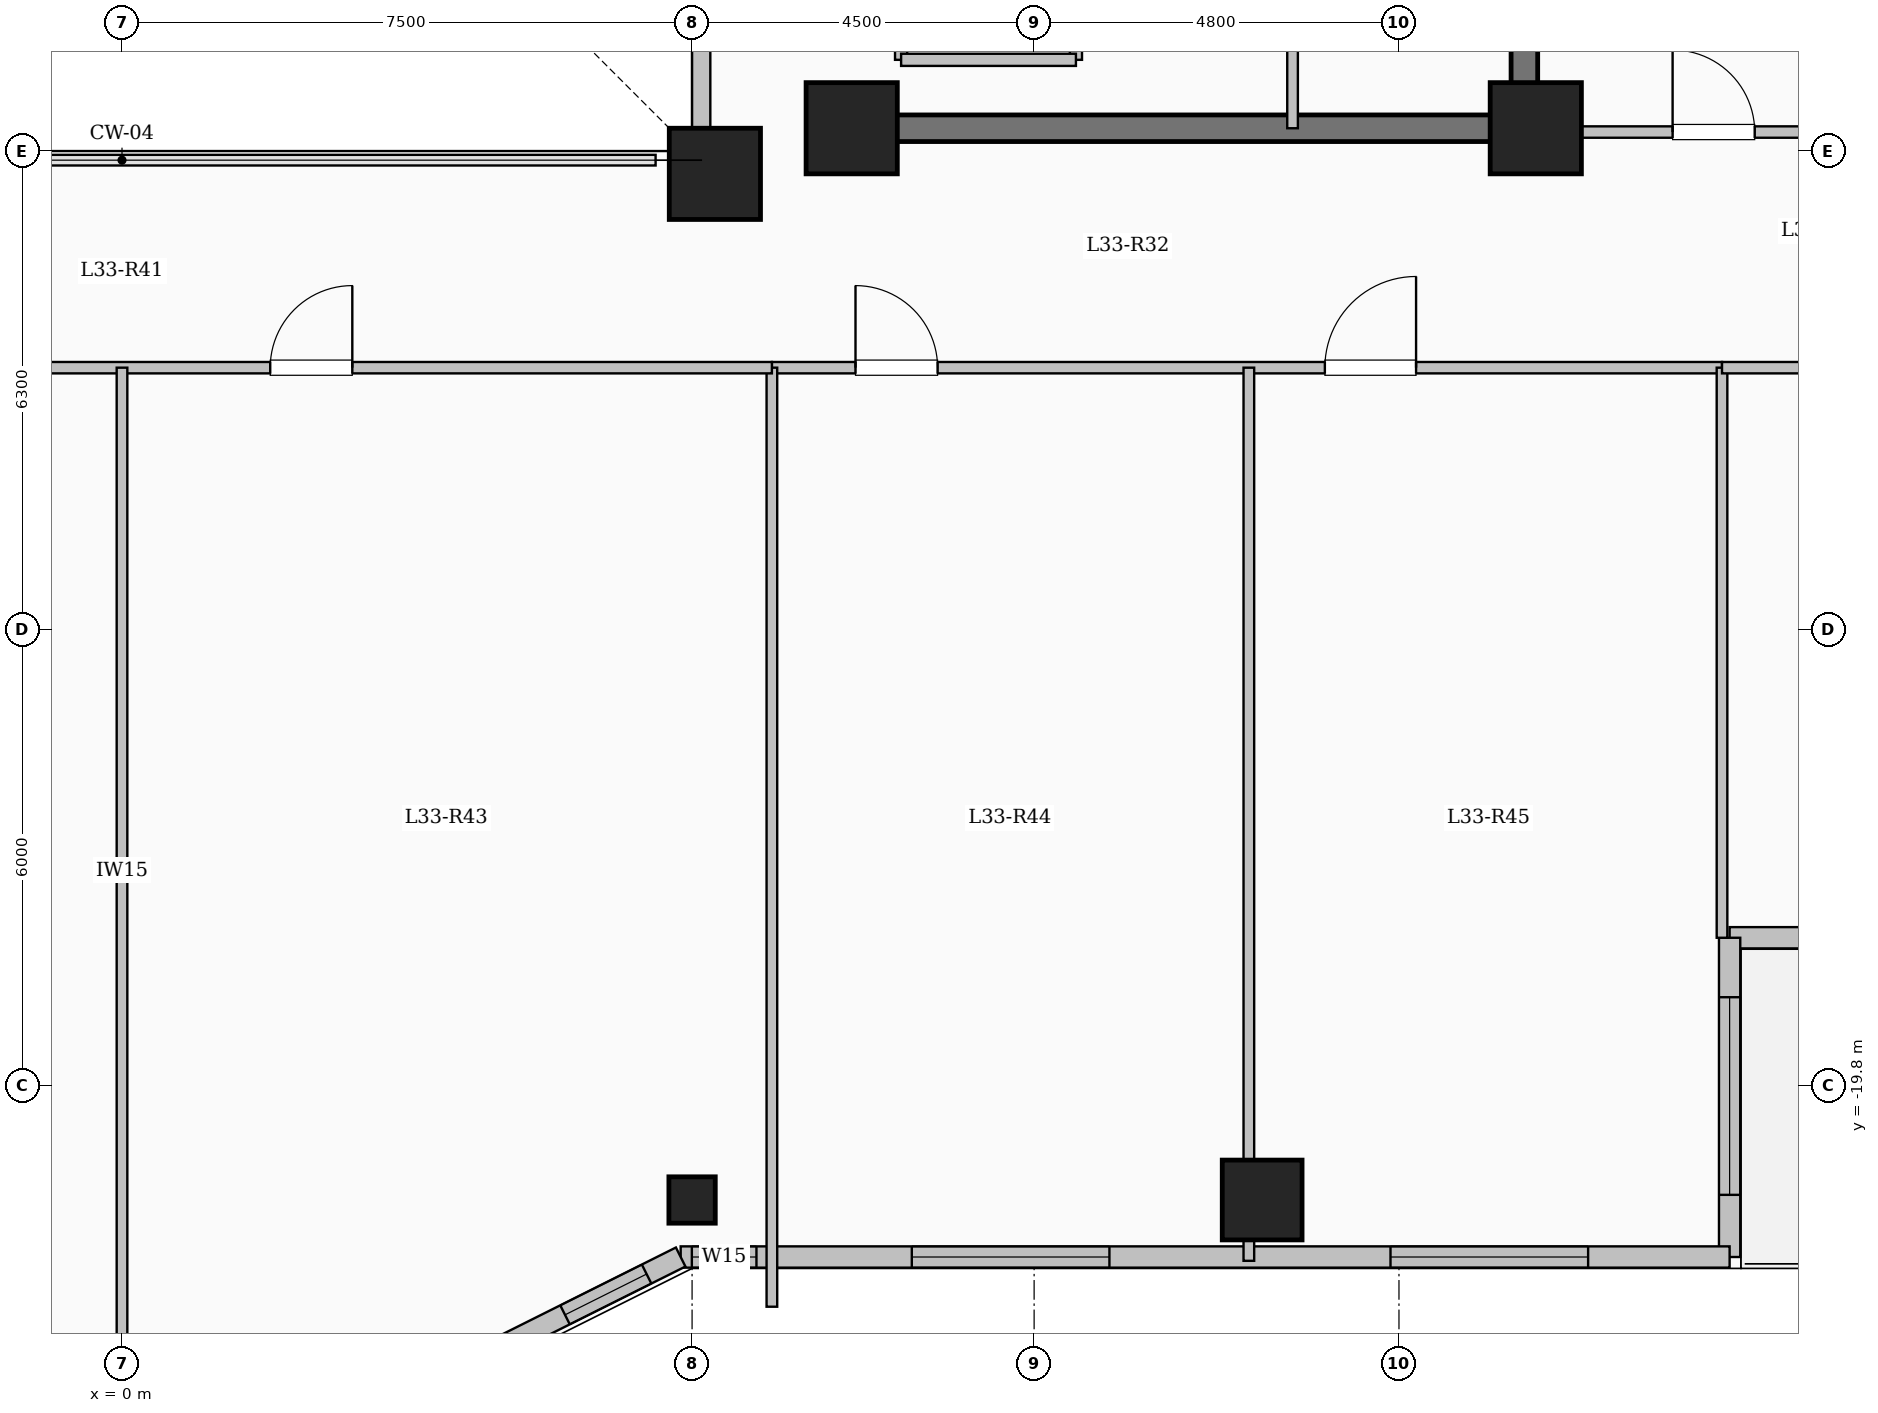
"""IFC4 building model, lengths in metres.
Left out: names, types, materials, properties, quantities, classifications, styles, units other than length and angle.
Written with IfcOpenShell. Run it as: python <this file> out.ifc"""

import sys

from ifc_helpers import new_model, si_unit, direction, frame, frame_2d, origin, origin_2d, place, context, subcontext, project, spatial, rectangle, hollow_circle, extrude, element, fill, save


model = new_model("IFC4")
c1 = context("Model", 3, precision=1e-05, world=origin(), true_north=direction((0.0, 1.0)))
c2 = subcontext(c1, "Body", "Model", "MODEL_VIEW")
j1 = project(units=[si_unit("LENGTHUNIT", "METRE"), si_unit("PLANEANGLEUNIT", "RADIAN")], contexts=[c1])
p1 = place(None, origin())
s1 = spatial("IfcSite", under=j1, at=p1, CompositionType="ELEMENT")
p2 = place(p1, origin())
s2 = spatial("IfcBuilding", under=s1, at=p2, CompositionType="ELEMENT")
p3 = place(p2, frame((0.0, 0.0, 123.0)))
s3 = spatial("IfcBuildingStorey", under=s2, at=p3, CompositionType="ELEMENT", Elevation=123.0)
for number, where, z_axis, x_axis in (
    (1, (7.8, -7.8, 0.0), (0.0, 0.0, 1.0), (1.0, 0.0, 0.0)),
    (2, (9.6, -7.2, 0.0), (0.0, 0.0, 1.0), (1.0, 0.0, 0.0)),
    (3, (18.6, -7.2, 0.0), (0.0, 0.0, 1.0), (1.0, 0.0, 0.0)),
):
    element("IfcColumn", number, at=place(p3, frame(where, z_axis=z_axis, x_axis=x_axis)), inside=s3, PredefinedType="COLUMN", context=c2, shape_type="SweptSolid", body=[
        extrude(rectangle(XDim=1.2, YDim=1.2, at=origin_2d()), origin(), (0.0, 0.0, 1.0), 4.5),
    ])
p4 = place(p3, frame((7.5, -21.3, 0.0), z_axis=(0.0, 0.0, 1.0), x_axis=(1.0, 0.0, 0.0)))
e4 = element("IfcColumn", 4, at=p4, inside=s3, PredefinedType="COLUMN", context=c2, shape_type="SweptSolid", body=[
    extrude(hollow_circle(Radius=0.305, WallThickness=0.025, at=origin_2d()), origin(), (0.0, 0.0, 1.0), 4.5),
])
p5 = place(p3, frame((15.0, -21.3, 0.0), z_axis=(0.0, 0.0, 1.0), x_axis=(1.0, 0.0, 0.0)))
e5 = element("IfcColumn", 5, at=p5, inside=s3, PredefinedType="COLUMN", context=c2, shape_type="SweptSolid", body=[
    extrude(rectangle(XDim=1.05, YDim=1.05, at=origin_2d()), origin(), (0.0, 0.0, 1.0), 4.5),
])
p6 = place(p3, frame((7.62, -7.62, 0.0), z_axis=(0.0, 0.0, 1.0), x_axis=(0.0, 1.0, 0.0)))
e6 = element("IfcWall", 6, at=p6, inside=s3, PredefinedType="SOLIDWALL", context=c2, shape_type="SweptSolid", body=[
    extrude(rectangle(XDim=15.24, YDim=0.24, at=frame_2d((7.62, 0.0))), origin(), (0.0, 0.0, 1.0), 4.2),
])
p7 = place(p6, frame((6.92, 0.0, 0.95)))
e7 = element("IfcOpeningElement", 7, at=p7, cuts=e6, PredefinedType="OPENING", context=c2, shape_type="SweptSolid", body=[
    extrude(rectangle(XDim=1.4, YDim=1.5, at=frame_2d((0.7, 0.75))), frame((0.0, 0.13, 0.0), z_axis=(0.0, -1.0, 0.0), x_axis=(1.0, 0.0, 0.0)), (0.0, 0.0, 1.0), 0.26),
])
p8 = place(p3, frame((26.85, -17.85, 0.0), z_axis=(0.0, 0.0, 1.0), x_axis=(-1.0, 0.0, 0.0)))
e8 = element("IfcWall", 8, at=p8, inside=s3, PredefinedType="SOLIDWALL", context=c2, shape_type="SweptSolid", body=[
    extrude(rectangle(XDim=5.7, YDim=0.28, at=frame_2d((2.85, 0.0))), origin(), (0.0, 0.0, 1.0), 4.2),
])
p9 = place(p8, frame((2.5, 0.0, 0.0)))
e9 = element("IfcOpeningElement", 9, at=p9, cuts=e8, PredefinedType="OPENING", context=c2, shape_type="SweptSolid", body=[
    extrude(rectangle(XDim=1.1, YDim=2.2, at=frame_2d((0.55, 1.1))), frame((0.0, 0.15, 0.0), z_axis=(0.0, -1.0, 0.0), x_axis=(1.0, 0.0, 0.0)), (0.0, 0.0, 1.0), 0.3),
])
p10 = place(p8, frame((0.755, 0.0, 0.95)))
e10 = element("IfcOpeningElement", 10, at=p10, cuts=e8, PredefinedType="OPENING", context=c2, shape_type="SweptSolid", body=[
    extrude(rectangle(XDim=1.2, YDim=1.5, at=frame_2d((0.6, 0.75))), frame((0.0, 0.15, 0.0), z_axis=(0.0, -1.0, 0.0), x_axis=(1.0, 0.0, 0.0)), (0.0, 0.0, 1.0), 0.3),
])
p11 = place(p3, frame((21.15, -17.85, 0.0), z_axis=(0.0, 0.0, 1.0), x_axis=(0.0, -1.0, 0.0)))
e11 = element("IfcWall", 11, at=p11, inside=s3, PredefinedType="SOLIDWALL", context=c2, shape_type="SweptSolid", body=[
    extrude(rectangle(XDim=4.2, YDim=0.28, at=frame_2d((2.1, 0.0))), origin(), (0.0, 0.0, 1.0), 4.2),
])
p12 = place(p11, frame((0.782, 0.0, 0.85)))
e12 = element("IfcOpeningElement", 12, at=p12, cuts=e11, PredefinedType="OPENING", context=c2, shape_type="SweptSolid", body=[
    extrude(rectangle(XDim=2.6, YDim=2.4, at=frame_2d((1.3, 1.2))), frame((0.0, 0.15, 0.0), z_axis=(0.0, -1.0, 0.0), x_axis=(1.0, 0.0, 0.0)), (0.0, 0.0, 1.0), 0.3),
])
p13 = place(p3, frame((21.15, -22.05, 0.0), z_axis=(0.0, 0.0, 1.0), x_axis=(-1.0, 0.0, 0.0)))
e13 = element("IfcWall", 13, at=p13, inside=s3, PredefinedType="SOLIDWALL", context=c2, shape_type="SweptSolid", body=[
    extrude(rectangle(XDim=13.8, YDim=0.28, at=frame_2d((6.9, 0.0))), origin(), (0.0, 0.0, 1.0), 4.2),
])
p14 = place(p13, frame((1.862, 0.0, 0.85)))
e14 = element("IfcOpeningElement", 14, at=p14, cuts=e13, PredefinedType="OPENING", context=c2, shape_type="SweptSolid", body=[
    extrude(rectangle(XDim=2.6, YDim=2.4, at=frame_2d((1.3, 1.2))), frame((0.0, 0.15, 0.0), z_axis=(0.0, -1.0, 0.0), x_axis=(1.0, 0.0, 0.0)), (0.0, 0.0, 1.0), 0.3),
])
p15 = place(p13, frame((8.159, 0.0, 0.85)))
e15 = element("IfcOpeningElement", 15, at=p15, cuts=e13, PredefinedType="OPENING", context=c2, shape_type="SweptSolid", body=[
    extrude(rectangle(XDim=2.6, YDim=2.4, at=frame_2d((1.3, 1.2))), frame((0.0, 0.15, 0.0), z_axis=(0.0, -1.0, 0.0), x_axis=(1.0, 0.0, 0.0)), (0.0, 0.0, 1.0), 0.3),
])
p16 = place(p13, frame((12.803, 0.0, 0.95)))
e16 = element("IfcOpeningElement", 16, at=p16, cuts=e13, PredefinedType="OPENING", context=c2, shape_type="SweptSolid", body=[
    extrude(rectangle(XDim=0.85, YDim=1.5, at=frame_2d((0.425, 0.75))), frame((0.0, 0.15, 0.0), z_axis=(0.0, -1.0, 0.0), x_axis=(1.0, 0.0, 0.0)), (0.0, 0.0, 1.0), 0.3),
])
p17 = place(p3, frame((7.35, -22.05, 0.0), z_axis=(0.0, 0.0, 1.0), x_axis=(-0.894427191, -0.4472135955, 0.0)))
e17 = element("IfcWall", 17, at=p17, inside=s3, PredefinedType="SOLIDWALL", context=c2, shape_type="SweptSolid", body=[
    extrude(rectangle(XDim=3.354, YDim=0.28, at=frame_2d((1.677, 0.0))), origin(), (0.0, 0.0, 1.0), 4.2),
])
p18 = place(p17, frame((0.501, 0.0, 0.95)))
e18 = element("IfcOpeningElement", 18, at=p18, cuts=e17, PredefinedType="OPENING", context=c2, shape_type="SweptSolid", body=[
    extrude(rectangle(XDim=1.2, YDim=1.5, at=frame_2d((0.6, 0.75))), frame((0.0, 0.15, 0.0), z_axis=(0.0, -1.0, 0.0), x_axis=(1.0, 0.0, 0.0)), (0.0, 0.0, 1.0), 0.3),
])
p19 = place(p3, frame((10.25, -6.3, 0.0), z_axis=(0.0, 0.0, 1.0), x_axis=(0.0, 1.0, 0.0)))
e19 = element("IfcWall", 19, at=p19, inside=s3, PredefinedType="SOLIDWALL", context=c2, shape_type="SweptSolid", body=[
    extrude(rectangle(XDim=2.6, YDim=0.16, at=frame_2d((1.3, 0.0))), origin(), (0.0, 0.0, 1.0), 4.2),
])
p20 = place(p19, frame((0.75, 0.0, 0.0)))
e20 = element("IfcOpeningElement", 20, at=p20, cuts=e19, PredefinedType="OPENING", context=c2, shape_type="SweptSolid", body=[
    extrude(rectangle(XDim=1.1, YDim=2.15, at=frame_2d((0.55, 1.075))), frame((0.0, 0.09, 0.0), z_axis=(0.0, -1.0, 0.0), x_axis=(1.0, 0.0, 0.0)), (0.0, 0.0, 1.0), 0.18),
])
p21 = place(p3, frame((12.55, -6.3, 0.0), z_axis=(0.0, 0.0, 1.0), x_axis=(0.0, 1.0, 0.0)))
e21 = element("IfcWall", 21, at=p21, inside=s3, PredefinedType="SOLIDWALL", context=c2, shape_type="SweptSolid", body=[
    extrude(rectangle(XDim=2.6, YDim=0.16, at=frame_2d((1.3, 0.0))), origin(), (0.0, 0.0, 1.0), 4.2),
])
p22 = place(p3, frame((10.25, -6.3, 0.0), z_axis=(0.0, 0.0, 1.0), x_axis=(1.0, 0.0, 0.0)))
e22 = element("IfcWall", 22, at=p22, inside=s3, PredefinedType="SOLIDWALL", context=c2, shape_type="SweptSolid", body=[
    extrude(rectangle(XDim=2.3, YDim=0.16, at=frame_2d((1.15, 0.0))), origin(), (0.0, 0.0, 1.0), 4.2),
])
p23 = place(p3, frame((18.45, -7.375, 0.0), z_axis=(0.0, 0.0, 1.0), x_axis=(0.0, 1.0, 0.0)))
e23 = element("IfcWall", 23, at=p23, inside=s3, PredefinedType="SHEAR", context=c2, shape_type="SweptSolid", body=[
    extrude(rectangle(XDim=14.05, YDim=0.35, at=frame_2d((7.025, 0.0))), origin(), (0.0, 0.0, 1.0), 4.5),
])
p24 = place(p3, frame((10.075, -7.2, 0.0), z_axis=(0.0, 0.0, 1.0), x_axis=(1.0, 0.0, 0.0)))
e24 = element("IfcWall", 24, at=p24, inside=s3, PredefinedType="SHEAR", context=c2, shape_type="SweptSolid", body=[
    extrude(rectangle(XDim=8.55, YDim=0.35, at=frame_2d((4.275, 0.0))), origin(), (0.0, 0.0, 1.0), 4.5),
])
p25 = place(p3, frame((15.4, -7.2, 0.0), z_axis=(0.0, 0.0, 1.0), x_axis=(0.0, 1.0, 0.0)))
e25 = element("IfcWall", 25, at=p25, inside=s3, PredefinedType="PARTITIONING", context=c2, shape_type="SweptSolid", body=[
    extrude(rectangle(XDim=10.45, YDim=0.14, at=frame_2d((5.225, 0.0))), origin(), (0.0, 0.0, 1.0), 4.2),
])
p26 = place(p25, frame((9.25, 0.0, 0.0)))
e26 = element("IfcOpeningElement", 26, at=p26, cuts=e25, PredefinedType="OPENING", context=c2, shape_type="SweptSolid", body=[
    extrude(rectangle(XDim=0.9, YDim=2.08, at=frame_2d((0.45, 1.04))), frame((0.0, 0.08, 0.0), z_axis=(0.0, -1.0, 0.0), x_axis=(1.0, 0.0, 0.0)), (0.0, 0.0, 1.0), 0.16),
])
p27 = place(p3, frame((8.55, -10.35, 0.0), z_axis=(0.0, 0.0, 1.0), x_axis=(1.0, 0.0, 0.0)))
e27 = element("IfcWall", 27, at=p27, inside=s3, PredefinedType="PARTITIONING", context=c2, shape_type="SweptSolid", body=[
    extrude(rectangle(XDim=12.5, YDim=0.15, at=frame_2d((6.25, 0.0))), origin(), (0.0, 0.0, 1.0), 4.2),
])
p28 = place(p27, frame((1.1, 0.0, 0.0)))
e28 = element("IfcOpeningElement", 28, at=p28, cuts=e27, PredefinedType="OPENING", context=c2, shape_type="SweptSolid", body=[
    extrude(rectangle(XDim=1.08, YDim=2.15, at=frame_2d((0.54, 1.075))), frame((0.0, 0.085, 0.0), z_axis=(0.0, -1.0, 0.0), x_axis=(1.0, 0.0, 0.0)), (0.0, 0.0, 1.0), 0.17),
])
p29 = place(p27, frame((7.275, 0.0, 0.0)))
e29 = element("IfcOpeningElement", 29, at=p29, cuts=e27, PredefinedType="OPENING", context=c2, shape_type="SweptSolid", body=[
    extrude(rectangle(XDim=1.2, YDim=2.15, at=frame_2d((0.6, 1.075))), frame((0.0, 0.085, 0.0), z_axis=(0.0, -1.0, 0.0), x_axis=(1.0, 0.0, 0.0)), (0.0, 0.0, 1.0), 0.17),
])
p30 = place(p3, frame((8.55, -22.704, 0.0), z_axis=(0.0, 0.0, 1.0), x_axis=(0.0, 1.0, 0.0)))
e30 = element("IfcWall", 30, at=p30, inside=s3, PredefinedType="PARTITIONING", context=c2, shape_type="SweptSolid", body=[
    extrude(rectangle(XDim=12.354, YDim=0.14, at=frame_2d((6.177, 0.0))), origin(), (0.0, 0.0, 1.0), 4.2),
])
p31 = place(p3, frame((14.825, -22.1, 0.0), z_axis=(0.0, 0.0, 1.0), x_axis=(0.0, 1.0, 0.0)))
e31 = element("IfcWall", 31, at=p31, inside=s3, PredefinedType="PARTITIONING", context=c2, shape_type="SweptSolid", body=[
    extrude(rectangle(XDim=11.75, YDim=0.14, at=frame_2d((5.875, 0.0))), origin(), (0.0, 0.0, 1.0), 3.535),
])
p32 = place(p3, frame((-8.55, -10.35, 0.0), z_axis=(0.0, 0.0, 1.0), x_axis=(1.0, 0.0, 0.0)))
e32 = element("IfcWall", 32, at=p32, inside=s3, PredefinedType="PARTITIONING", context=c2, shape_type="SweptSolid", body=[
    extrude(rectangle(XDim=17.1, YDim=0.15, at=frame_2d((8.55, 0.0))), origin(), (0.0, 0.0, 1.0), 4.2),
])
p33 = place(p32, frame((1.4, 0.0, 0.0)))
e33 = element("IfcOpeningElement", 33, at=p33, cuts=e32, PredefinedType="OPENING", context=c2, shape_type="SweptSolid", body=[
    extrude(rectangle(XDim=1.08, YDim=2.15, at=frame_2d((0.54, 1.075))), frame((0.0, 0.085, 0.0), z_axis=(0.0, -1.0, 0.0), x_axis=(1.0, 0.0, 0.0)), (0.0, 0.0, 1.0), 0.17),
])
p34 = place(p32, frame((10.5, 0.0, 0.0)))
e34 = element("IfcOpeningElement", 34, at=p34, cuts=e32, PredefinedType="OPENING", context=c2, shape_type="SweptSolid", body=[
    extrude(rectangle(XDim=1.08, YDim=2.15, at=frame_2d((0.54, 1.075))), frame((0.0, 0.085, 0.0), z_axis=(0.0, -1.0, 0.0), x_axis=(1.0, 0.0, 0.0)), (0.0, 0.0, 1.0), 0.17),
])
p35 = place(p3, frame((0.0, -23.58, 0.0), z_axis=(0.0, 0.0, 1.0), x_axis=(0.0, 1.0, 0.0)))
e35 = element("IfcWall", 35, at=p35, inside=s3, PredefinedType="PARTITIONING", context=c2, shape_type="SweptSolid", body=[
    extrude(rectangle(XDim=13.23, YDim=0.14, at=frame_2d((6.615, 0.0))), origin(), (0.0, 0.0, 1.0), 4.2),
])
p36 = place(p3, frame((18.45, -7.25, 0.0), z_axis=(0.0, 0.0, 1.0), x_axis=(1.0, 0.0, 0.0)))
e36 = element("IfcWall", 36, at=p36, inside=s3, PredefinedType="PARTITIONING", context=c2, shape_type="SweptSolid", body=[
    extrude(rectangle(XDim=8.43, YDim=0.15, at=frame_2d((4.215, 0.0))), origin(), (0.0, 0.0, 1.0), 4.2),
])
p37 = place(p36, frame((1.95, 0.0, 0.0)))
e37 = element("IfcOpeningElement", 37, at=p37, cuts=e36, PredefinedType="OPENING", context=c2, shape_type="SweptSolid", body=[
    extrude(rectangle(XDim=1.08, YDim=2.15, at=frame_2d((0.54, 1.075))), frame((0.0, 0.085, 0.0), z_axis=(0.0, -1.0, 0.0), x_axis=(1.0, 0.0, 0.0)), (0.0, 0.0, 1.0), 0.17),
])
p38 = place(p3, frame((21.05, -17.85, 0.0), z_axis=(0.0, 0.0, 1.0), x_axis=(0.0, 1.0, 0.0)))
e38 = element("IfcWall", 38, at=p38, inside=s3, PredefinedType="PARTITIONING", context=c2, shape_type="SweptSolid", body=[
    extrude(rectangle(XDim=7.5, YDim=0.14, at=frame_2d((3.75, 0.0))), origin(), (0.0, 0.0, 1.0), 4.2),
])
p39 = place(p3, frame((21.05, -10.35, 0.0), z_axis=(0.0, 0.0, 1.0), x_axis=(1.0, 0.0, 0.0)))
e39 = element("IfcWall", 39, at=p39, inside=s3, PredefinedType="PARTITIONING", context=c2, shape_type="SweptSolid", body=[
    extrude(rectangle(XDim=5.83, YDim=0.15, at=frame_2d((2.915, 0.0))), origin(), (0.0, 0.0, 1.0), 4.2),
])
p40 = place(p39, frame((2.44, 0.0, 0.0)))
e40 = element("IfcOpeningElement", 40, at=p40, cuts=e39, PredefinedType="OPENING", context=c2, shape_type="SweptSolid", body=[
    extrude(rectangle(XDim=0.95, YDim=2.15, at=frame_2d((0.475, 1.075))), frame((0.0, 0.085, 0.0), z_axis=(0.0, -1.0, 0.0), x_axis=(1.0, 0.0, 0.0)), (0.0, 0.0, 1.0), 0.17),
])
p41 = place(p12, origin())
e41 = element("IfcWindow", 41, at=p41, inside=s3, PartitioningType="SINGLE_PANEL", PredefinedType="WINDOW", context=c2, shape_type="SweptSolid", body=[
    extrude(rectangle(XDim=2.6, YDim=2.4, at=frame_2d((1.3, 1.2))), frame((0.0, 0.03, 0.0), z_axis=(0.0, -1.0, 0.0), x_axis=(1.0, 0.0, 0.0)), (0.0, 0.0, 1.0), 0.06),
])
fill(e12, e41)
p42 = place(p14, origin())
e42 = element("IfcWindow", 42, at=p42, inside=s3, PartitioningType="SINGLE_PANEL", PredefinedType="WINDOW", context=c2, shape_type="SweptSolid", body=[
    extrude(rectangle(XDim=2.6, YDim=2.4, at=frame_2d((1.3, 1.2))), frame((0.0, 0.03, 0.0), z_axis=(0.0, -1.0, 0.0), x_axis=(1.0, 0.0, 0.0)), (0.0, 0.0, 1.0), 0.06),
])
fill(e14, e42)
p43 = place(p15, origin())
e43 = element("IfcWindow", 43, at=p43, inside=s3, PartitioningType="SINGLE_PANEL", PredefinedType="WINDOW", context=c2, shape_type="SweptSolid", body=[
    extrude(rectangle(XDim=2.6, YDim=2.4, at=frame_2d((1.3, 1.2))), frame((0.0, 0.03, 0.0), z_axis=(0.0, -1.0, 0.0), x_axis=(1.0, 0.0, 0.0)), (0.0, 0.0, 1.0), 0.06),
])
fill(e15, e43)
p44 = place(p16, origin())
e44 = element("IfcWindow", 44, at=p44, inside=s3, PartitioningType="SINGLE_PANEL", PredefinedType="WINDOW", context=c2, shape_type="SweptSolid", body=[
    extrude(rectangle(XDim=0.85, YDim=1.5, at=frame_2d((0.425, 0.75))), frame((0.0, 0.03, 0.0), z_axis=(0.0, -1.0, 0.0), x_axis=(1.0, 0.0, 0.0)), (0.0, 0.0, 1.0), 0.06),
])
fill(e16, e44)
p45 = place(p18, origin())
e45 = element("IfcWindow", 45, at=p45, inside=s3, PartitioningType="SINGLE_PANEL", PredefinedType="WINDOW", context=c2, shape_type="SweptSolid", body=[
    extrude(rectangle(XDim=1.2, YDim=1.5, at=frame_2d((0.6, 0.75))), frame((0.0, 0.03, 0.0), z_axis=(0.0, -1.0, 0.0), x_axis=(1.0, 0.0, 0.0)), (0.0, 0.0, 1.0), 0.06),
])
fill(e18, e45)
p46 = place(p34, origin())
e46 = element("IfcDoor", 46, at=p46, inside=s3, OperationType="SINGLE_SWING_RIGHT", PredefinedType="DOOR", context=c2, shape_type="SweptSolid", body=[
    extrude(rectangle(XDim=1.08, YDim=2.15, at=frame_2d((0.54, 1.075))), frame((0.0, 0.025, 0.0), z_axis=(0.0, -1.0, 0.0), x_axis=(1.0, 0.0, 0.0)), (0.0, 0.0, 1.0), 0.05),
])
fill(e34, e46)
p47 = place(p28, origin())
e47 = element("IfcDoor", 47, at=p47, inside=s3, OperationType="SINGLE_SWING_LEFT", PredefinedType="DOOR", context=c2, shape_type="SweptSolid", body=[
    extrude(rectangle(XDim=1.08, YDim=2.15, at=frame_2d((0.54, 1.075))), frame((0.0, 0.025, 0.0), z_axis=(0.0, -1.0, 0.0), x_axis=(1.0, 0.0, 0.0)), (0.0, 0.0, 1.0), 0.05),
])
fill(e28, e47)
p48 = place(p29, origin())
e48 = element("IfcDoor", 48, at=p48, inside=s3, OperationType="SINGLE_SWING_RIGHT", PredefinedType="DOOR", context=c2, shape_type="SweptSolid", body=[
    extrude(rectangle(XDim=1.2, YDim=2.15, at=frame_2d((0.6, 1.075))), frame((0.0, 0.025, 0.0), z_axis=(0.0, -1.0, 0.0), x_axis=(1.0, 0.0, 0.0)), (0.0, 0.0, 1.0), 0.05),
])
fill(e29, e48)
p49 = place(p37, origin())
e49 = element("IfcDoor", 49, at=p49, inside=s3, OperationType="SINGLE_SWING_LEFT", PredefinedType="DOOR", context=c2, shape_type="SweptSolid", body=[
    extrude(rectangle(XDim=1.08, YDim=2.15, at=frame_2d((0.54, 1.075))), frame((0.0, 0.025, 0.0), z_axis=(0.0, -1.0, 0.0), x_axis=(1.0, 0.0, 0.0)), (0.0, 0.0, 1.0), 0.05),
])
fill(e37, e49)
save(model, sys.argv[1])
